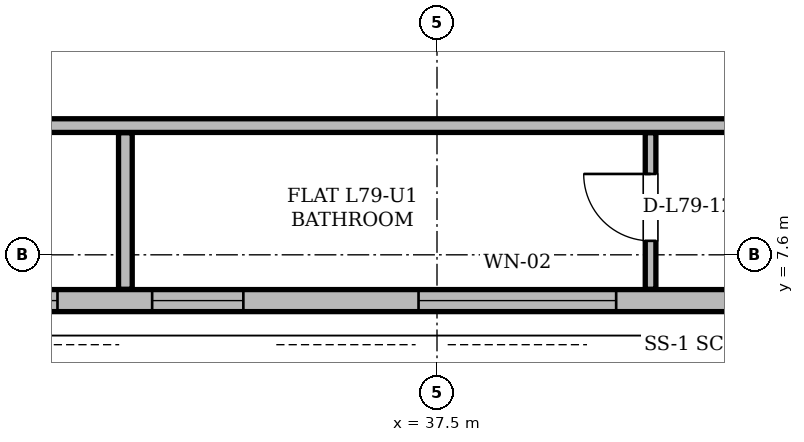
"""IFC4 building model, lengths in metres.
Left out: names, types, materials, properties, quantities, classifications, styles, units other than length and angle.
Written with IfcOpenShell. Run it as: python <this file> out.ifc"""

import sys

from ifc_helpers import new_model, si_unit, direction, frame, frame_2d, origin, place, context, subcontext, project, spatial, rectangle, extrude, element, fill, save


model = new_model("IFC4")
c1 = context("Model", 3, precision=1e-05, world=origin(), true_north=direction((0.0, 1.0)))
c2 = subcontext(c1, "Body", "Model", "MODEL_VIEW")
j1 = project(units=[si_unit("LENGTHUNIT", "METRE"), si_unit("PLANEANGLEUNIT", "RADIAN")], contexts=[c1])
p1 = place(None, origin())
s1 = spatial("IfcSite", under=j1, at=p1, CompositionType="ELEMENT")
p2 = place(p1, origin())
s2 = spatial("IfcBuilding", under=s1, at=p2, CompositionType="ELEMENT")
p3 = place(p2, frame((0.0, 0.0, 301.2)))
s3 = spatial("IfcBuildingStorey", under=s2, at=p3, CompositionType="ELEMENT", Elevation=301.2)
p4 = place(p3, frame((18.671, 6.998, 0.0), z_axis=(0.0, 0.0, 1.0), x_axis=(1.0, 0.0, 0.0)))
e1 = element("IfcWall", 1, at=p4, inside=s3, PredefinedType="SOLIDWALL", context=c2, shape_type="SweptSolid", body=[
    extrude(rectangle(XDim=37.658, YDim=0.29, at=frame_2d((18.829, 0.0))), origin(), (0.0, 0.0, 1.0), 3.058),
])
p5 = place(p4, frame((8.034, 0.0, 0.0)))
e2 = element("IfcOpeningElement", 2, at=p5, cuts=e1, PredefinedType="OPENING", context=c2, shape_type="SweptSolid", body=[
    extrude(rectangle(XDim=1.5, YDim=2.2, at=frame_2d((0.75, 1.1))), frame((0.0, 0.145, 0.0), z_axis=(0.0, -1.0, 0.0), x_axis=(1.0, 0.0, 0.0)), (0.0, 0.0, 1.0), 0.29),
])
p6 = place(p4, frame((32.308, 0.0, 0.0)))
e3 = element("IfcOpeningElement", 3, at=p6, cuts=e1, PredefinedType="OPENING", context=c2, shape_type="SweptSolid", body=[
    extrude(rectangle(XDim=1.5, YDim=2.2, at=frame_2d((0.75, 1.1))), frame((0.0, 0.145, 0.0), z_axis=(0.0, -1.0, 0.0), x_axis=(1.0, 0.0, 0.0)), (0.0, 0.0, 1.0), 0.29),
])
p7 = place(p4, frame((23.819, 0.0, 0.85)))
e4 = element("IfcOpeningElement", 4, at=p7, cuts=e1, PredefinedType="OPENING", context=c2, shape_type="SweptSolid", body=[
    extrude(rectangle(XDim=1.2, YDim=1.48, at=frame_2d((0.6, 0.74))), frame((0.0, 0.145, 0.0), z_axis=(0.0, -1.0, 0.0), x_axis=(1.0, 0.0, 0.0)), (0.0, 0.0, 1.0), 0.29),
])
p8 = place(p4, frame((34.596, 0.0, 0.85)))
e5 = element("IfcOpeningElement", 5, at=p8, cuts=e1, PredefinedType="OPENING", context=c2, shape_type="SweptSolid", body=[
    extrude(rectangle(XDim=1.2, YDim=1.48, at=frame_2d((0.6, 0.74))), frame((0.0, 0.145, 0.0), z_axis=(0.0, -1.0, 0.0), x_axis=(1.0, 0.0, 0.0)), (0.0, 0.0, 1.0), 0.29),
])
p9 = place(p4, frame((15.081, 0.0, 0.85)))
e6 = element("IfcOpeningElement", 6, at=p9, cuts=e1, PredefinedType="OPENING", context=c2, shape_type="SweptSolid", body=[
    extrude(rectangle(XDim=1.2, YDim=1.48, at=frame_2d((0.6, 0.74))), frame((0.0, 0.145, 0.0), z_axis=(0.0, -1.0, 0.0), x_axis=(1.0, 0.0, 0.0)), (0.0, 0.0, 1.0), 0.29),
])
p10 = place(p4, frame((18.586, 0.0, 0.85)))
e7 = element("IfcOpeningElement", 7, at=p10, cuts=e1, PredefinedType="OPENING", context=c2, shape_type="SweptSolid", body=[
    extrude(rectangle(XDim=2.6, YDim=1.95, at=frame_2d((1.3, 0.975))), frame((0.0, 0.145, 0.0), z_axis=(0.0, -1.0, 0.0), x_axis=(1.0, 0.0, 0.0)), (0.0, 0.0, 1.0), 0.29),
])
p11 = place(p4, frame((1.729, 0.0, 0.85)))
e8 = element("IfcOpeningElement", 8, at=p11, cuts=e1, PredefinedType="OPENING", context=c2, shape_type="SweptSolid", body=[
    extrude(rectangle(XDim=2.5, YDim=2.098, at=frame_2d((1.25, 1.049))), frame((0.0, 0.145, 0.0), z_axis=(0.0, -1.0, 0.0), x_axis=(1.0, 0.0, 0.0)), (0.0, 0.0, 1.0), 0.29),
])
p12 = place(p4, frame((12.635, 0.0, 0.85)))
e9 = element("IfcOpeningElement", 9, at=p12, cuts=e1, PredefinedType="OPENING", context=c2, shape_type="SweptSolid", body=[
    extrude(rectangle(XDim=1.2, YDim=1.48, at=frame_2d((0.6, 0.74))), frame((0.0, 0.145, 0.0), z_axis=(0.0, -1.0, 0.0), x_axis=(1.0, 0.0, 0.0)), (0.0, 0.0, 1.0), 0.29),
])
p13 = place(p3, frame((25.6, 9.3, 0.0), z_axis=(0.0, 0.0, 1.0), x_axis=(1.0, 0.0, 0.0)))
e10 = element("IfcWall", 10, at=p13, inside=s3, PredefinedType="PARTITIONING", context=c2, shape_type="SweptSolid", body=[
    extrude(rectangle(XDim=21.85, YDim=0.18, at=frame_2d((10.925, 0.0))), origin(), (0.0, 0.0, 1.0), 3.68),
])
p14 = place(p13, frame((3.868, 0.0, 0.0)))
e11 = element("IfcOpeningElement", 11, at=p14, cuts=e10, PredefinedType="OPENING", context=c2, shape_type="SweptSolid", body=[
    extrude(rectangle(XDim=1.0, YDim=2.18, at=frame_2d((0.5, 1.09))), frame((0.0, 0.09, 0.0), z_axis=(0.0, -1.0, 0.0), x_axis=(1.0, 0.0, 0.0)), (0.0, 0.0, 1.0), 0.18),
])
p15 = place(p13, frame((17.17, 0.0, 0.0)))
e12 = element("IfcOpeningElement", 12, at=p15, cuts=e10, PredefinedType="OPENING", context=c2, shape_type="SweptSolid", body=[
    extrude(rectangle(XDim=1.0, YDim=2.18, at=frame_2d((0.5, 1.09))), frame((0.0, 0.09, 0.0), z_axis=(0.0, -1.0, 0.0), x_axis=(1.0, 0.0, 0.0)), (0.0, 0.0, 1.0), 0.18),
])
p16 = place(p3, frame((33.4, 7.147, 0.0), z_axis=(0.0, 0.0, 1.0), x_axis=(0.0, 1.0, 0.0)))
e13 = element("IfcWall", 13, at=p16, inside=s3, PredefinedType="PARTITIONING", context=c2, shape_type="SweptSolid", body=[
    extrude(rectangle(XDim=2.059, YDim=0.18, at=frame_2d((1.03, 0.0))), origin(), (0.0, 0.0, 1.0), 3.68),
])
p17 = place(p3, frame((40.31, 7.147, 0.0), z_axis=(0.0, 0.0, 1.0), x_axis=(0.0, 1.0, 0.0)))
e14 = element("IfcWall", 14, at=p17, inside=s3, PredefinedType="PARTITIONING", context=c2, shape_type="SweptSolid", body=[
    extrude(rectangle(XDim=2.059, YDim=0.14, at=frame_2d((1.03, 0.0))), origin(), (0.0, 0.0, 1.0), 3.68),
])
p18 = place(p17, frame((0.637, 0.0, 0.0)))
e15 = element("IfcOpeningElement", 15, at=p18, cuts=e14, PredefinedType="OPENING", context=c2, shape_type="SweptSolid", body=[
    extrude(rectangle(XDim=0.88, YDim=2.08, at=frame_2d((0.44, 1.04))), frame((0.0, 0.07, 0.0), z_axis=(0.0, -1.0, 0.0), x_axis=(1.0, 0.0, 0.0)), (0.0, 0.0, 1.0), 0.14),
])
p19 = place(p9, origin())
e16 = element("IfcWindow", 16, at=p19, inside=s3, PartitioningType="SINGLE_PANEL", PredefinedType="WINDOW", context=c2, shape_type="SweptSolid", body=[
    extrude(rectangle(XDim=1.2, YDim=1.48, at=frame_2d((0.6, 0.74))), frame((0.0, 0.03, 0.0), z_axis=(0.0, -1.0, 0.0), x_axis=(1.0, 0.0, 0.0)), (0.0, 0.0, 1.0), 0.06),
])
fill(e6, e16)
p20 = place(p10, origin())
e17 = element("IfcWindow", 17, at=p20, inside=s3, PartitioningType="SINGLE_PANEL", PredefinedType="WINDOW", context=c2, shape_type="SweptSolid", body=[
    extrude(rectangle(XDim=2.6, YDim=1.95, at=frame_2d((1.3, 0.975))), frame((0.0, 0.03, 0.0), z_axis=(0.0, -1.0, 0.0), x_axis=(1.0, 0.0, 0.0)), (0.0, 0.0, 1.0), 0.06),
])
fill(e7, e17)
p21 = place(p12, origin())
e18 = element("IfcWindow", 18, at=p21, inside=s3, PartitioningType="SINGLE_PANEL", PredefinedType="WINDOW", context=c2, shape_type="SweptSolid", body=[
    extrude(rectangle(XDim=1.2, YDim=1.48, at=frame_2d((0.6, 0.74))), frame((0.0, 0.03, 0.0), z_axis=(0.0, -1.0, 0.0), x_axis=(1.0, 0.0, 0.0)), (0.0, 0.0, 1.0), 0.06),
])
fill(e9, e18)
p22 = place(p18, origin())
e19 = element("IfcDoor", 19, at=p22, inside=s3, OperationType="SINGLE_SWING_RIGHT", PredefinedType="DOOR", context=c2, shape_type="SweptSolid", body=[
    extrude(rectangle(XDim=0.88, YDim=2.08, at=frame_2d((0.44, 1.04))), frame((0.0, 0.025, 0.0), z_axis=(0.0, -1.0, 0.0), x_axis=(1.0, 0.0, 0.0)), (0.0, 0.0, 1.0), 0.05),
])
fill(e15, e19)
save(model, sys.argv[1])
